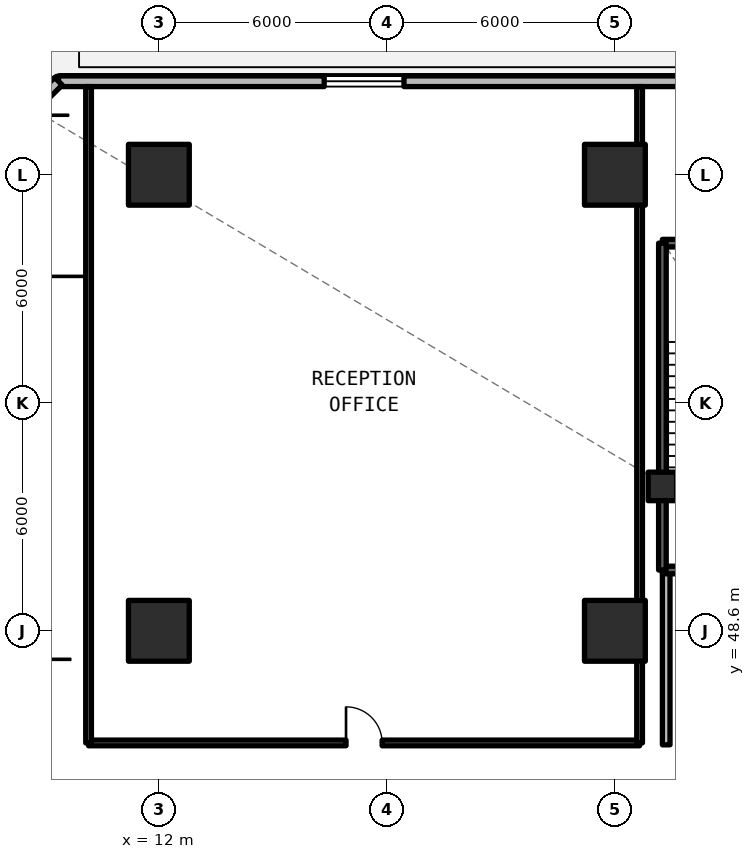
"""IFC4 building model, lengths in metres.
Left out: names, types, materials, properties, quantities, classifications, styles, units other than length and angle.
Written with IfcOpenShell. Run it as: python <this file> out.ifc"""

import sys

from ifc_helpers import new_model, si_unit, direction, frame, frame_2d, origin, origin_2d, place, context, subcontext, project, spatial, rectangle, extrude, element, fill, save


model = new_model("IFC4")
c1 = context("Model", 3, precision=1e-05, world=origin(), true_north=direction((0.0, 1.0)))
c2 = subcontext(c1, "Body", "Model", "MODEL_VIEW")
j1 = project(units=[si_unit("LENGTHUNIT", "METRE"), si_unit("PLANEANGLEUNIT", "RADIAN")], contexts=[c1])
p1 = place(None, origin())
s1 = spatial("IfcSite", under=j1, at=p1, CompositionType="ELEMENT")
p2 = place(p1, origin())
s2 = spatial("IfcBuilding", under=s1, at=p2, CompositionType="ELEMENT")
p3 = place(p2, frame((0.0, 0.0, 19.47)))
s3 = spatial("IfcBuildingStorey", under=s2, at=p3, CompositionType="ELEMENT", Elevation=19.47)
for number, where, z_axis, x_axis in (
    (1, (12.0, 60.6, 0.0), (0.0, 0.0, 1.0), (1.0, 0.0, 0.0)),
    (2, (24.0, 60.6, 0.0), (0.0, 0.0, 1.0), (1.0, 0.0, 0.0)),
    (3, (12.0, 48.6, 0.0), (0.0, 0.0, 1.0), (1.0, 0.0, 0.0)),
    (4, (24.0, 48.6, 0.0), (0.0, 0.0, 1.0), (1.0, 0.0, 0.0)),
):
    element("IfcColumn", number, at=place(p3, frame(where, z_axis=z_axis, x_axis=x_axis)), inside=s3, PredefinedType="COLUMN", context=c2, shape_type="SweptSolid", body=[
        extrude(rectangle(XDim=1.6, YDim=1.6, at=origin_2d()), origin(), (0.0, 0.0, 1.0), 4.62),
    ])
p4 = place(p3, frame((25.25, 52.4, 0.0), z_axis=(0.0, 0.0, 1.0), x_axis=(1.0, 0.0, 0.0)))
e5 = element("IfcColumn", 5, at=p4, inside=s3, PredefinedType="COLUMN", context=c2, shape_type="SweptSolid", body=[
    extrude(rectangle(XDim=0.75, YDim=0.75, at=origin_2d()), origin(), (0.0, 0.0, 1.0), 4.27),
])
p5 = place(p3, frame((104.642, 63.06, 0.0), z_axis=(0.0, 0.0, 1.0), x_axis=(-1.0, 0.0, 0.0)))
e6 = element("IfcWall", 6, at=p5, inside=s3, PredefinedType="SOLIDWALL", context=c2, shape_type="SweptSolid", body=[
    extrude(rectangle(XDim=95.284, YDim=0.28, at=frame_2d((47.642, 0.0))), origin(), (0.0, 0.0, 1.0), 4.27),
])
p6 = place(p5, frame((47.892, 0.0, 0.0)))
e7 = element("IfcOpeningElement", 7, at=p6, cuts=e6, PredefinedType="OPENING", context=c2, shape_type="SweptSolid", body=[
    extrude(rectangle(XDim=1.5, YDim=2.2, at=frame_2d((0.75, 1.1))), frame((0.0, 0.15, 0.0), z_axis=(0.0, -1.0, 0.0), x_axis=(1.0, 0.0, 0.0)), (0.0, 0.0, 1.0), 0.3),
])
p7 = place(p5, frame((86.192, 0.0, 0.78)))
e8 = element("IfcOpeningElement", 8, at=p7, cuts=e6, PredefinedType="OPENING", context=c2, shape_type="SweptSolid", body=[
    extrude(rectangle(XDim=2.1, YDim=1.66, at=frame_2d((1.05, 0.83))), frame((0.0, 0.15, 0.0), z_axis=(0.0, -1.0, 0.0), x_axis=(1.0, 0.0, 0.0)), (0.0, 0.0, 1.0), 0.3),
])
p8 = place(p5, frame((68.992, 0.0, 0.78)))
e9 = element("IfcOpeningElement", 9, at=p8, cuts=e6, PredefinedType="OPENING", context=c2, shape_type="SweptSolid", body=[
    extrude(rectangle(XDim=2.1, YDim=1.66, at=frame_2d((1.05, 0.83))), frame((0.0, 0.15, 0.0), z_axis=(0.0, -1.0, 0.0), x_axis=(1.0, 0.0, 0.0)), (0.0, 0.0, 1.0), 0.3),
])
p9 = place(p5, frame((59.792, 0.0, 0.78)))
e10 = element("IfcOpeningElement", 10, at=p9, cuts=e6, PredefinedType="OPENING", context=c2, shape_type="SweptSolid", body=[
    extrude(rectangle(XDim=2.1, YDim=1.66, at=frame_2d((1.05, 0.83))), frame((0.0, 0.15, 0.0), z_axis=(0.0, -1.0, 0.0), x_axis=(1.0, 0.0, 0.0)), (0.0, 0.0, 1.0), 0.3),
])
p10 = place(p5, frame((41.692, 0.0, 0.78)))
e11 = element("IfcOpeningElement", 11, at=p10, cuts=e6, PredefinedType="OPENING", context=c2, shape_type="SweptSolid", body=[
    extrude(rectangle(XDim=2.1, YDim=1.66, at=frame_2d((1.05, 0.83))), frame((0.0, 0.15, 0.0), z_axis=(0.0, -1.0, 0.0), x_axis=(1.0, 0.0, 0.0)), (0.0, 0.0, 1.0), 0.3),
])
p11 = place(p5, frame((25.992, 0.0, 0.78)))
e12 = element("IfcOpeningElement", 12, at=p11, cuts=e6, PredefinedType="OPENING", context=c2, shape_type="SweptSolid", body=[
    extrude(rectangle(XDim=2.1, YDim=1.66, at=frame_2d((1.05, 0.83))), frame((0.0, 0.15, 0.0), z_axis=(0.0, -1.0, 0.0), x_axis=(1.0, 0.0, 0.0)), (0.0, 0.0, 1.0), 0.3),
])
p12 = place(p5, frame((7.192, 0.0, 0.78)))
e13 = element("IfcOpeningElement", 13, at=p12, cuts=e6, PredefinedType="OPENING", context=c2, shape_type="SweptSolid", body=[
    extrude(rectangle(XDim=2.1, YDim=1.66, at=frame_2d((1.05, 0.83))), frame((0.0, 0.15, 0.0), z_axis=(0.0, -1.0, 0.0), x_axis=(1.0, 0.0, 0.0)), (0.0, 0.0, 1.0), 0.3),
])
p13 = place(p5, frame((34.892, 0.0, 0.78)))
e14 = element("IfcOpeningElement", 14, at=p13, cuts=e6, PredefinedType="OPENING", context=c2, shape_type="SweptSolid", body=[
    extrude(rectangle(XDim=2.1, YDim=1.66, at=frame_2d((1.05, 0.83))), frame((0.0, 0.15, 0.0), z_axis=(0.0, -1.0, 0.0), x_axis=(1.0, 0.0, 0.0)), (0.0, 0.0, 1.0), 0.3),
])
p14 = place(p5, frame((76.192, 0.0, 0.78)))
e15 = element("IfcOpeningElement", 15, at=p14, cuts=e6, PredefinedType="OPENING", context=c2, shape_type="SweptSolid", body=[
    extrude(rectangle(XDim=2.1, YDim=1.66, at=frame_2d((1.05, 0.83))), frame((0.0, 0.15, 0.0), z_axis=(0.0, -1.0, 0.0), x_axis=(1.0, 0.0, 0.0)), (0.0, 0.0, 1.0), 0.3),
])
p15 = place(p3, frame((9.358, 63.06, 0.0), z_axis=(0.0, 0.0, 1.0), x_axis=(-0.707064005301, -0.707149554485, 0.0)))
e16 = element("IfcWall", 16, at=p15, inside=s3, PredefinedType="SOLIDWALL", context=c2, shape_type="SweptSolid", body=[
    extrude(rectangle(XDim=2.854, YDim=0.28, at=frame_2d((1.427, 0.0))), origin(), (0.0, 0.0, 1.0), 4.27),
])
p16 = place(p15, frame((0.727, 0.0, 0.78)))
e17 = element("IfcOpeningElement", 17, at=p16, cuts=e16, PredefinedType="OPENING", context=c2, shape_type="SweptSolid", body=[
    extrude(rectangle(XDim=1.4, YDim=1.65, at=frame_2d((0.7, 0.825))), frame((0.0, 0.15, 0.0), z_axis=(0.0, -1.0, 0.0), x_axis=(1.0, 0.0, 0.0)), (0.0, 0.0, 1.0), 0.3),
])
p17 = place(p3, frame((25.35, 45.6, 0.0), z_axis=(0.0, 0.0, 1.0), x_axis=(0.0, 1.0, 0.0)))
e18 = element("IfcWall", 18, at=p17, inside=s3, PredefinedType="SOLIDWALL", context=c2, shape_type="SweptSolid", body=[
    extrude(rectangle(XDim=4.6, YDim=0.2, at=frame_2d((2.3, 0.0))), origin(), (0.0, 0.0, 1.0), 3.49),
])
p18 = place(p3, frame((10.15, 45.65, 0.0), z_axis=(0.0, 0.0, 1.0), x_axis=(1.0, 0.0, 0.0)))
e19 = element("IfcWall", 19, at=p18, inside=s3, PredefinedType="SOLIDWALL", context=c2, shape_type="SweptSolid", body=[
    extrude(rectangle(XDim=14.5, YDim=0.15, at=frame_2d((7.25, 0.0))), origin(), (0.0, 0.0, 1.0), 3.49),
])
p19 = place(p18, frame((6.775, 0.0, 0.0)))
e20 = element("IfcOpeningElement", 20, at=p19, cuts=e19, PredefinedType="OPENING", context=c2, shape_type="SweptSolid", body=[
    extrude(rectangle(XDim=0.95, YDim=2.15, at=frame_2d((0.475, 1.075))), frame((0.0, 0.085, 0.0), z_axis=(0.0, -1.0, 0.0), x_axis=(1.0, 0.0, 0.0)), (0.0, 0.0, 1.0), 0.17),
])
for number, where, z_axis, x_axis in (
    (21, (10.15, 45.65, 0.0), (0.0, 0.0, 1.0), (0.0, 1.0, 0.0)),
    (22, (24.65, 45.65, 0.0), (0.0, 0.0, 1.0), (0.0, 1.0, 0.0)),
):
    element("IfcWall", number, at=place(p3, frame(where, z_axis=z_axis, x_axis=x_axis)), inside=s3, PredefinedType="SOLIDWALL", context=c2, shape_type="SweptSolid", body=[
        extrude(rectangle(XDim=17.27, YDim=0.15, at=frame_2d((8.635, 0.0))), origin(), (0.0, 0.0, 1.0), 3.49),
    ])
p20 = place(p3, frame((25.25, 50.2, 0.0), z_axis=(0.0, 0.0, 1.0), x_axis=(1.0, 0.0, 0.0)))
e23 = element("IfcWall", 23, at=p20, inside=s3, PredefinedType="SOLIDWALL", context=c2, shape_type="SweptSolid", body=[
    extrude(rectangle(XDim=4.4, YDim=0.2, at=frame_2d((2.2, 0.0))), origin(), (0.0, 0.0, 1.0), 4.62),
])
p21 = place(p20, frame((1.625, 0.0, 0.0)))
e24 = element("IfcOpeningElement", 24, at=p21, cuts=e23, PredefinedType="OPENING", context=c2, shape_type="SweptSolid", body=[
    extrude(rectangle(XDim=1.15, YDim=2.15, at=frame_2d((0.575, 1.075))), frame((0.0, 0.11, 0.0), z_axis=(0.0, -1.0, 0.0), x_axis=(1.0, 0.0, 0.0)), (0.0, 0.0, 1.0), 0.22),
])
p22 = place(p3, frame((29.65, 58.8, 0.0), z_axis=(0.0, 0.0, 1.0), x_axis=(-1.0, 0.0, 0.0)))
e25 = element("IfcWall", 25, at=p22, inside=s3, PredefinedType="SOLIDWALL", context=c2, shape_type="SweptSolid", body=[
    extrude(rectangle(XDim=4.4, YDim=0.2, at=frame_2d((2.2, 0.0))), origin(), (0.0, 0.0, 1.0), 4.62),
])
p23 = place(p3, frame((25.25, 58.8, 0.0), z_axis=(0.0, 0.0, 1.0), x_axis=(0.0, -1.0, 0.0)))
e26 = element("IfcWall", 26, at=p23, inside=s3, PredefinedType="SOLIDWALL", context=c2, shape_type="SweptSolid", body=[
    extrude(rectangle(XDim=8.6, YDim=0.2, at=frame_2d((4.3, 0.0))), origin(), (0.0, 0.0, 1.0), 4.62),
])
p24 = place(p7, origin())
e27 = element("IfcWindow", 27, at=p24, inside=s3, PartitioningType="SINGLE_PANEL", PredefinedType="WINDOW", context=c2, shape_type="SweptSolid", body=[
    extrude(rectangle(XDim=2.1, YDim=1.66, at=frame_2d((1.05, 0.83))), frame((0.0, 0.03, 0.0), z_axis=(0.0, -1.0, 0.0), x_axis=(1.0, 0.0, 0.0)), (0.0, 0.0, 1.0), 0.06),
])
fill(e8, e27)
p25 = place(p19, origin())
e28 = element("IfcDoor", 28, at=p25, inside=s3, OperationType="SINGLE_SWING_LEFT", PredefinedType="DOOR", context=c2, shape_type="SweptSolid", body=[
    extrude(rectangle(XDim=0.95, YDim=2.15, at=frame_2d((0.475, 1.075))), frame((0.0, 0.025, 0.0), z_axis=(0.0, -1.0, 0.0), x_axis=(1.0, 0.0, 0.0)), (0.0, 0.0, 1.0), 0.05),
])
fill(e20, e28)
save(model, sys.argv[1])
